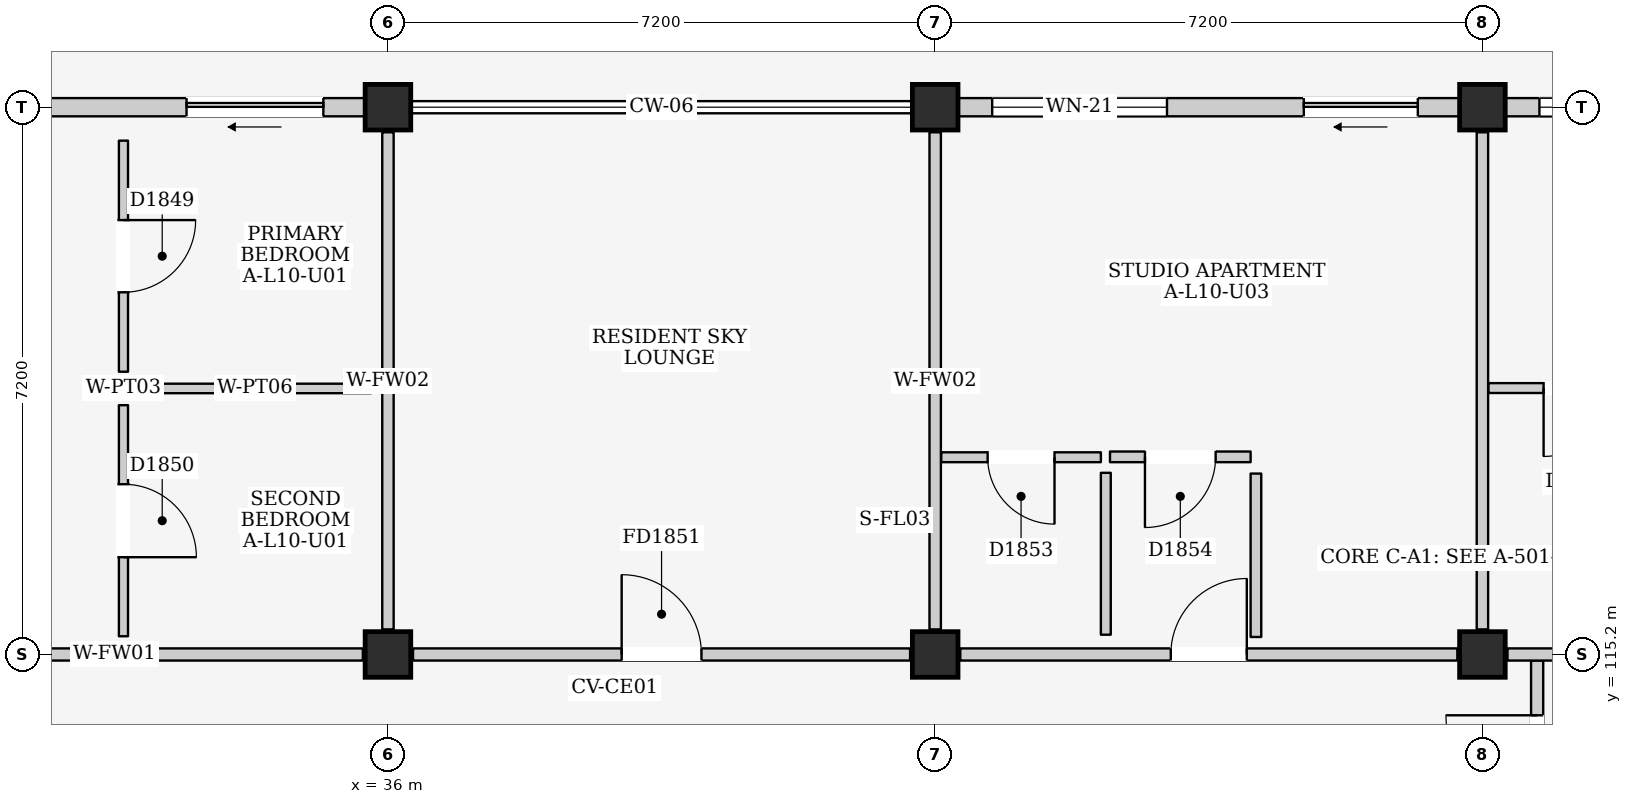
"""IFC4 building model, lengths in metres.
Left out: names, types, materials, properties, quantities, classifications, styles, units other than length and angle.
Written with IfcOpenShell. Run it as: python <this file> out.ifc"""

import sys

from ifc_helpers import new_model, si_unit, direction, frame, frame_2d, origin, origin_2d, place, context, subcontext, project, spatial, rectangle, extrude, element, fill, save


model = new_model("IFC4")
c1 = context("Model", 3, precision=1e-05, world=origin(), true_north=direction((0.0, 1.0)))
c2 = subcontext(c1, "Body", "Model", "MODEL_VIEW")
j1 = project(units=[si_unit("LENGTHUNIT", "METRE"), si_unit("PLANEANGLEUNIT", "RADIAN")], contexts=[c1])
p1 = place(None, origin())
s1 = spatial("IfcSite", under=j1, at=p1, CompositionType="ELEMENT")
p2 = place(p1, origin())
s2 = spatial("IfcBuilding", under=s1, at=p2, CompositionType="ELEMENT")
p3 = place(p2, frame((0.0, 0.0, 34.8)))
s3 = spatial("IfcBuildingStorey", under=s2, at=p3, CompositionType="ELEMENT", Elevation=34.8)
for number, where, z_axis, x_axis in (
    (1, (36.0, 115.2, 0.0), (0.0, 0.0, 1.0), (1.0, 0.0, 0.0)),
    (2, (36.0, 122.4, 0.0), (0.0, 0.0, 1.0), (1.0, 0.0, 0.0)),
    (3, (43.2, 115.2, 0.0), (0.0, 0.0, 1.0), (1.0, 0.0, 0.0)),
    (4, (43.2, 122.4, 0.0), (0.0, 0.0, 1.0), (1.0, 0.0, 0.0)),
    (5, (50.4, 115.2, 0.0), (0.0, 0.0, 1.0), (1.0, 0.0, 0.0)),
    (6, (50.4, 122.4, 0.0), (0.0, 0.0, 1.0), (1.0, 0.0, 0.0)),
):
    element("IfcColumn", number, at=place(p3, frame(where, z_axis=z_axis, x_axis=x_axis)), inside=s3, PredefinedType="COLUMN", context=c2, shape_type="SweptSolid", body=[
        extrude(rectangle(XDim=0.6, YDim=0.6, at=origin_2d()), origin(), (0.0, 0.0, 1.0), 3.2),
    ])
p4 = place(p3, frame((29.1, 122.4, 0.0), z_axis=(0.0, 0.0, 1.0), x_axis=(1.0, 0.0, 0.0)))
e7 = element("IfcWall", 7, at=p4, inside=s3, PredefinedType="ELEMENTEDWALL", context=c2, shape_type="SweptSolid", body=[
    extrude(rectangle(XDim=6.6, YDim=0.24, at=frame_2d((3.3, 0.0))), origin(), (0.0, 0.0, 1.0), 2.495),
])
p5 = place(p4, frame((4.25, 0.0, 0.0)))
e8 = element("IfcOpeningElement", 8, at=p5, cuts=e7, PredefinedType="OPENING", context=c2, shape_type="SweptSolid", body=[
    extrude(rectangle(XDim=1.8, YDim=2.12, at=frame_2d((0.9, 1.06))), frame((0.0, 0.135, 0.0), z_axis=(0.0, -1.0, 0.0), x_axis=(1.0, 0.0, 0.0)), (0.0, 0.0, 1.0), 0.27),
])
p6 = place(p4, frame((0.45, 0.0, 0.9)))
e9 = element("IfcOpeningElement", 9, at=p6, cuts=e7, PredefinedType="OPENING", context=c2, shape_type="SweptSolid", body=[
    extrude(rectangle(XDim=1.65, YDim=1.35, at=frame_2d((0.825, 0.675))), frame((0.0, 0.135, 0.0), z_axis=(0.0, -1.0, 0.0), x_axis=(1.0, 0.0, 0.0)), (0.0, 0.0, 1.0), 0.27),
])
p7 = place(p3, frame((43.5, 122.4, 0.0), z_axis=(0.0, 0.0, 1.0), x_axis=(1.0, 0.0, 0.0)))
e10 = element("IfcWall", 10, at=p7, inside=s3, PredefinedType="ELEMENTEDWALL", context=c2, shape_type="SweptSolid", body=[
    extrude(rectangle(XDim=6.6, YDim=0.24, at=frame_2d((3.3, 0.0))), origin(), (0.0, 0.0, 1.0), 2.495),
])
p8 = place(p7, frame((4.55, 0.0, 0.0)))
e11 = element("IfcOpeningElement", 11, at=p8, cuts=e10, PredefinedType="OPENING", context=c2, shape_type="SweptSolid", body=[
    extrude(rectangle(XDim=1.5, YDim=2.12, at=frame_2d((0.75, 1.06))), frame((0.0, 0.135, 0.0), z_axis=(0.0, -1.0, 0.0), x_axis=(1.0, 0.0, 0.0)), (0.0, 0.0, 1.0), 0.27),
])
p9 = place(p7, frame((0.45, 0.0, 0.785)))
e12 = element("IfcOpeningElement", 12, at=p9, cuts=e10, PredefinedType="OPENING", context=c2, shape_type="SweptSolid", body=[
    extrude(rectangle(XDim=2.3, YDim=1.6, at=frame_2d((1.15, 0.8))), frame((0.0, 0.135, 0.0), z_axis=(0.0, -1.0, 0.0), x_axis=(1.0, 0.0, 0.0)), (0.0, 0.0, 1.0), 0.27),
])
p10 = place(p3, frame((50.7, 122.4, 0.0), z_axis=(0.0, 0.0, 1.0), x_axis=(1.0, 0.0, 0.0)))
e13 = element("IfcWall", 13, at=p10, inside=s3, PredefinedType="ELEMENTEDWALL", context=c2, shape_type="SweptSolid", body=[
    extrude(rectangle(XDim=6.6, YDim=0.24, at=frame_2d((3.3, 0.0))), origin(), (0.0, 0.0, 1.0), 2.495),
])
p11 = place(p10, frame((3.65, 0.0, 0.0)))
e14 = element("IfcOpeningElement", 14, at=p11, cuts=e13, PredefinedType="OPENING", context=c2, shape_type="SweptSolid", body=[
    extrude(rectangle(XDim=2.4, YDim=2.12, at=frame_2d((1.2, 1.06))), frame((0.0, 0.135, 0.0), z_axis=(0.0, -1.0, 0.0), x_axis=(1.0, 0.0, 0.0)), (0.0, 0.0, 1.0), 0.27),
])
p12 = place(p10, frame((0.45, 0.0, 0.9)))
e15 = element("IfcOpeningElement", 15, at=p12, cuts=e13, PredefinedType="OPENING", context=c2, shape_type="SweptSolid", body=[
    extrude(rectangle(XDim=1.55, YDim=1.45, at=frame_2d((0.775, 0.725))), frame((0.0, 0.135, 0.0), z_axis=(0.0, -1.0, 0.0), x_axis=(1.0, 0.0, 0.0)), (0.0, 0.0, 1.0), 0.27),
])
p13 = place(p3, frame((51.12, 111.1, 0.0), z_axis=(0.0, 0.0, 1.0), x_axis=(0.0, 1.0, 0.0)))
e16 = element("IfcWall", 16, at=p13, inside=s3, PredefinedType="PARTITIONING", context=c2, shape_type="SweptSolid", body=[
    extrude(rectangle(XDim=4.02, YDim=0.16, at=frame_2d((2.01, 0.0))), origin(), (0.0, 0.0, 1.0), 2.96),
])
p14 = place(p13, frame((2.1, 0.0, 0.0)))
e17 = element("IfcOpeningElement", 17, at=p14, cuts=e16, PredefinedType="OPENING", context=c2, shape_type="SweptSolid", body=[
    extrude(rectangle(XDim=1.2, YDim=2.2, at=frame_2d((0.6, 1.1))), frame((0.0, 0.095, 0.0), z_axis=(0.0, -1.0, 0.0), x_axis=(1.0, 0.0, 0.0)), (0.0, 0.0, 1.0), 0.19),
])
p15 = place(p3, frame((29.13, 115.2, 0.0), z_axis=(0.0, 0.0, 1.0), x_axis=(1.0, 0.0, 0.0)))
e18 = element("IfcWall", 18, at=p15, inside=s3, PredefinedType="PARTITIONING", context=c2, shape_type="SweptSolid", body=[
    extrude(rectangle(XDim=6.54, YDim=0.16, at=frame_2d((3.27, 0.0))), origin(), (0.0, 0.0, 1.0), 2.295),
])
p16 = place(p15, frame((0.18, 0.0, 0.0)))
e19 = element("IfcOpeningElement", 19, at=p16, cuts=e18, PredefinedType="OPENING", context=c2, shape_type="SweptSolid", body=[
    extrude(rectangle(XDim=1.0, YDim=2.15, at=frame_2d((0.5, 1.075))), frame((0.0, 0.095, 0.0), z_axis=(0.0, -1.0, 0.0), x_axis=(1.0, 0.0, 0.0)), (0.0, 0.0, 1.0), 0.19),
])
p17 = place(p3, frame((36.0, 115.53, 0.0), z_axis=(0.0, 0.0, 1.0), x_axis=(0.0, 1.0, 0.0)))
e20 = element("IfcWall", 20, at=p17, inside=s3, PredefinedType="PARTITIONING", context=c2, shape_type="SweptSolid", body=[
    extrude(rectangle(XDim=6.54, YDim=0.15, at=frame_2d((3.27, 0.0))), origin(), (0.0, 0.0, 1.0), 2.445),
])
p18 = place(p3, frame((32.52, 118.92, 0.0), z_axis=(0.0, 0.0, 1.0), x_axis=(0.0, 1.0, 0.0)))
e21 = element("IfcWall", 21, at=p18, inside=s3, PredefinedType="PARTITIONING", context=c2, shape_type="SweptSolid", body=[
    extrude(rectangle(XDim=3.04, YDim=0.12, at=frame_2d((1.52, 0.0))), origin(), (0.0, 0.0, 1.0), 2.96),
])
p19 = place(p18, frame((1.045, 0.0, 0.0)))
e22 = element("IfcOpeningElement", 22, at=p19, cuts=e21, PredefinedType="OPENING", context=c2, shape_type="SweptSolid", body=[
    extrude(rectangle(XDim=0.95, YDim=2.15, at=frame_2d((0.475, 1.075))), frame((0.0, 0.075, 0.0), z_axis=(0.0, -1.0, 0.0), x_axis=(1.0, 0.0, 0.0)), (0.0, 0.0, 1.0), 0.15),
])
p20 = place(p3, frame((32.72, 118.7, 0.0), z_axis=(0.0, 0.0, 1.0), x_axis=(1.0, 0.0, 0.0)))
e23 = element("IfcWall", 23, at=p20, inside=s3, PredefinedType="PARTITIONING", context=c2, shape_type="SweptSolid", body=[
    extrude(rectangle(XDim=3.06, YDim=0.125, at=frame_2d((1.53, 0.0))), origin(), (0.0, 0.0, 1.0), 2.96),
])
p21 = place(p3, frame((32.52, 115.44, 0.0), z_axis=(0.0, 0.0, 1.0), x_axis=(0.0, 1.0, 0.0)))
e24 = element("IfcWall", 24, at=p21, inside=s3, PredefinedType="PARTITIONING", context=c2, shape_type="SweptSolid", body=[
    extrude(rectangle(XDim=3.04, YDim=0.12, at=frame_2d((1.52, 0.0))), origin(), (0.0, 0.0, 1.0), 2.96),
])
p22 = place(p21, frame((1.04, 0.0, 0.0)))
e25 = element("IfcOpeningElement", 25, at=p22, cuts=e24, PredefinedType="OPENING", context=c2, shape_type="SweptSolid", body=[
    extrude(rectangle(XDim=0.96, YDim=2.15, at=frame_2d((0.48, 1.075))), frame((0.0, 0.075, 0.0), z_axis=(0.0, -1.0, 0.0), x_axis=(1.0, 0.0, 0.0)), (0.0, 0.0, 1.0), 0.15),
])
p23 = place(p3, frame((36.33, 115.2, 0.0), z_axis=(0.0, 0.0, 1.0), x_axis=(1.0, 0.0, 0.0)))
e26 = element("IfcWall", 26, at=p23, inside=s3, PredefinedType="PARTITIONING", context=c2, shape_type="SweptSolid", body=[
    extrude(rectangle(XDim=6.54, YDim=0.16, at=frame_2d((3.27, 0.0))), origin(), (0.0, 0.0, 1.0), 2.295),
])
p24 = place(p23, frame((2.745, 0.0, 0.0)))
e27 = element("IfcOpeningElement", 27, at=p24, cuts=e26, PredefinedType="OPENING", context=c2, shape_type="SweptSolid", body=[
    extrude(rectangle(XDim=1.05, YDim=2.15, at=frame_2d((0.525, 1.075))), frame((0.0, 0.095, 0.0), z_axis=(0.0, -1.0, 0.0), x_axis=(1.0, 0.0, 0.0)), (0.0, 0.0, 1.0), 0.19),
])
p25 = place(p3, frame((43.2, 115.53, 0.0), z_axis=(0.0, 0.0, 1.0), x_axis=(0.0, 1.0, 0.0)))
e28 = element("IfcWall", 28, at=p25, inside=s3, PredefinedType="PARTITIONING", context=c2, shape_type="SweptSolid", body=[
    extrude(rectangle(XDim=6.54, YDim=0.15, at=frame_2d((3.27, 0.0))), origin(), (0.0, 0.0, 1.0), 2.445),
])
p26 = place(p3, frame((43.53, 115.2, 0.0), z_axis=(0.0, 0.0, 1.0), x_axis=(1.0, 0.0, 0.0)))
e29 = element("IfcWall", 29, at=p26, inside=s3, PredefinedType="PARTITIONING", context=c2, shape_type="SweptSolid", body=[
    extrude(rectangle(XDim=6.54, YDim=0.16, at=frame_2d((3.27, 0.0))), origin(), (0.0, 0.0, 1.0), 2.295),
])
p27 = place(p26, frame((2.77, 0.0, 0.0)))
e30 = element("IfcOpeningElement", 30, at=p27, cuts=e29, PredefinedType="OPENING", context=c2, shape_type="SweptSolid", body=[
    extrude(rectangle(XDim=1.0, YDim=2.15, at=frame_2d((0.5, 1.075))), frame((0.0, 0.095, 0.0), z_axis=(0.0, -1.0, 0.0), x_axis=(1.0, 0.0, 0.0)), (0.0, 0.0, 1.0), 0.19),
])
p28 = place(p3, frame((50.4, 115.53, 0.0), z_axis=(0.0, 0.0, 1.0), x_axis=(0.0, 1.0, 0.0)))
e31 = element("IfcWall", 31, at=p28, inside=s3, PredefinedType="PARTITIONING", context=c2, shape_type="SweptSolid", body=[
    extrude(rectangle(XDim=6.54, YDim=0.15, at=frame_2d((3.27, 0.0))), origin(), (0.0, 0.0, 1.0), 2.445),
])
p29 = place(p3, frame((43.28, 117.795, 0.0), z_axis=(0.0, 0.0, 1.0), x_axis=(1.0, 0.0, 0.0)))
e32 = element("IfcWall", 32, at=p29, inside=s3, PredefinedType="PARTITIONING", context=c2, shape_type="SweptSolid", body=[
    extrude(rectangle(XDim=2.1, YDim=0.13, at=frame_2d((1.05, 0.0))), origin(), (0.0, 0.0, 1.0), 2.96),
])
p30 = place(p29, frame((0.61, 0.0, 0.0)))
e33 = element("IfcOpeningElement", 33, at=p30, cuts=e32, PredefinedType="OPENING", context=c2, shape_type="SweptSolid", body=[
    extrude(rectangle(XDim=0.88, YDim=2.1, at=frame_2d((0.44, 1.05))), frame((0.0, 0.08, 0.0), z_axis=(0.0, -1.0, 0.0), x_axis=(1.0, 0.0, 0.0)), (0.0, 0.0, 1.0), 0.16),
])
p31 = place(p3, frame((45.445, 115.46, 0.0), z_axis=(0.0, 0.0, 1.0), x_axis=(0.0, 1.0, 0.0)))
e34 = element("IfcWall", 34, at=p31, inside=s3, PredefinedType="PARTITIONING", context=c2, shape_type="SweptSolid", body=[
    extrude(rectangle(XDim=2.13, YDim=0.13, at=frame_2d((1.065, 0.0))), origin(), (0.0, 0.0, 1.0), 2.96),
])
p32 = place(p3, frame((45.5, 117.8, 0.0), z_axis=(0.0, 0.0, 1.0), x_axis=(1.0, 0.0, 0.0)))
e35 = element("IfcWall", 35, at=p32, inside=s3, PredefinedType="PARTITIONING", context=c2, shape_type="SweptSolid", body=[
    extrude(rectangle(XDim=1.85, YDim=0.14, at=frame_2d((0.925, 0.0))), origin(), (0.0, 0.0, 1.0), 2.96),
])
p33 = place(p32, frame((0.46, 0.0, 0.0)))
e36 = element("IfcOpeningElement", 36, at=p33, cuts=e35, PredefinedType="OPENING", context=c2, shape_type="SweptSolid", body=[
    extrude(rectangle(XDim=0.93, YDim=2.14, at=frame_2d((0.465, 1.07))), frame((0.0, 0.085, 0.0), z_axis=(0.0, -1.0, 0.0), x_axis=(1.0, 0.0, 0.0)), (0.0, 0.0, 1.0), 0.17),
])
p34 = place(p3, frame((47.42, 115.43, 0.0), z_axis=(0.0, 0.0, 1.0), x_axis=(0.0, 1.0, 0.0)))
e37 = element("IfcWall", 37, at=p34, inside=s3, PredefinedType="PARTITIONING", context=c2, shape_type="SweptSolid", body=[
    extrude(rectangle(XDim=2.15, YDim=0.14, at=frame_2d((1.075, 0.0))), origin(), (0.0, 0.0, 1.0), 2.96),
])
p35 = place(p3, frame((50.73, 115.2, 0.0), z_axis=(0.0, 0.0, 1.0), x_axis=(1.0, 0.0, 0.0)))
e38 = element("IfcWall", 38, at=p35, inside=s3, PredefinedType="PARTITIONING", context=c2, shape_type="SweptSolid", body=[
    extrude(rectangle(XDim=6.54, YDim=0.16, at=frame_2d((3.27, 0.0))), origin(), (0.0, 0.0, 1.0), 2.295),
])
p36 = place(p3, frame((50.48, 118.705, 0.0), z_axis=(0.0, 0.0, 1.0), x_axis=(1.0, 0.0, 0.0)))
e39 = element("IfcWall", 39, at=p36, inside=s3, PredefinedType="PARTITIONING", context=c2, shape_type="SweptSolid", body=[
    extrude(rectangle(XDim=2.35, YDim=0.13, at=frame_2d((1.175, 0.0))), origin(), (0.0, 0.0, 1.0), 2.96),
])
p37 = place(p36, frame((0.725, 0.0, 0.0)))
e40 = element("IfcOpeningElement", 40, at=p37, cuts=e39, PredefinedType="OPENING", context=c2, shape_type="SweptSolid", body=[
    extrude(rectangle(XDim=0.9, YDim=2.1, at=frame_2d((0.45, 1.05))), frame((0.0, 0.08, 0.0), z_axis=(0.0, -1.0, 0.0), x_axis=(1.0, 0.0, 0.0)), (0.0, 0.0, 1.0), 0.16),
])
p38 = place(p5, frame((1.8, 0.0, 0.0), z_axis=(0.0, 0.0, 1.0), x_axis=(-1.0, 0.0, 0.0)))
e41 = element("IfcDoor", 41, at=p38, inside=s3, OperationType="SLIDING_TO_LEFT", PredefinedType="DOOR", context=c2, shape_type="SweptSolid", body=[
    extrude(rectangle(XDim=1.8, YDim=2.12, at=frame_2d((0.9, 1.06))), frame((0.0, 0.025, 0.0), z_axis=(0.0, -1.0, 0.0), x_axis=(1.0, 0.0, 0.0)), (0.0, 0.0, 1.0), 0.05),
])
fill(e8, e41)
p39 = place(p8, frame((1.5, 0.0, 0.0), z_axis=(0.0, 0.0, 1.0), x_axis=(-1.0, 0.0, 0.0)))
e42 = element("IfcDoor", 42, at=p39, inside=s3, OperationType="SLIDING_TO_LEFT", PredefinedType="DOOR", context=c2, shape_type="SweptSolid", body=[
    extrude(rectangle(XDim=1.5, YDim=2.12, at=frame_2d((0.75, 1.06))), frame((0.0, 0.025, 0.0), z_axis=(0.0, -1.0, 0.0), x_axis=(1.0, 0.0, 0.0)), (0.0, 0.0, 1.0), 0.05),
])
fill(e11, e42)
p40 = place(p9, origin())
e43 = element("IfcWindow", 43, at=p40, inside=s3, PartitioningType="TRIPLE_PANEL_VERTICAL", PredefinedType="WINDOW", context=c2, shape_type="SweptSolid", body=[
    extrude(rectangle(XDim=2.3, YDim=1.6, at=frame_2d((1.15, 0.8))), frame((0.0, 0.03, 0.0), z_axis=(0.0, -1.0, 0.0), x_axis=(1.0, 0.0, 0.0)), (0.0, 0.0, 1.0), 0.06),
])
fill(e12, e43)
p41 = place(p12, origin())
e44 = element("IfcWindow", 44, at=p41, inside=s3, PartitioningType="DOUBLE_PANEL_VERTICAL", PredefinedType="WINDOW", context=c2, shape_type="SweptSolid", body=[
    extrude(rectangle(XDim=1.55, YDim=1.45, at=frame_2d((0.775, 0.725))), frame((0.0, 0.03, 0.0), z_axis=(0.0, -1.0, 0.0), x_axis=(1.0, 0.0, 0.0)), (0.0, 0.0, 1.0), 0.06),
])
fill(e15, e44)
p42 = place(p14, origin())
e45 = element("IfcDoor", 45, at=p42, inside=s3, OperationType="SINGLE_SWING_RIGHT", PredefinedType="DOOR", context=c2, shape_type="SweptSolid", body=[
    extrude(rectangle(XDim=1.2, YDim=2.2, at=frame_2d((0.6, 1.1))), frame((0.0, 0.025, 0.0), z_axis=(0.0, -1.0, 0.0), x_axis=(1.0, 0.0, 0.0)), (0.0, 0.0, 1.0), 0.05),
])
fill(e17, e45)
p43 = place(p19, frame((0.95, 0.0, 0.0), z_axis=(0.0, 0.0, 1.0), x_axis=(-1.0, 0.0, 0.0)))
e46 = element("IfcDoor", 46, at=p43, inside=s3, OperationType="SINGLE_SWING_LEFT", PredefinedType="DOOR", context=c2, shape_type="SweptSolid", body=[
    extrude(rectangle(XDim=0.95, YDim=2.15, at=frame_2d((0.475, 1.075))), frame((0.0, 0.025, 0.0), z_axis=(0.0, -1.0, 0.0), x_axis=(1.0, 0.0, 0.0)), (0.0, 0.0, 1.0), 0.05),
])
fill(e22, e46)
p44 = place(p22, frame((0.96, 0.0, 0.0), z_axis=(0.0, 0.0, 1.0), x_axis=(-1.0, 0.0, 0.0)))
e47 = element("IfcDoor", 47, at=p44, inside=s3, OperationType="SINGLE_SWING_RIGHT", PredefinedType="DOOR", context=c2, shape_type="SweptSolid", body=[
    extrude(rectangle(XDim=0.96, YDim=2.15, at=frame_2d((0.48, 1.075))), frame((0.0, 0.025, 0.0), z_axis=(0.0, -1.0, 0.0), x_axis=(1.0, 0.0, 0.0)), (0.0, 0.0, 1.0), 0.05),
])
fill(e25, e47)
p45 = place(p24, origin())
e48 = element("IfcDoor", 48, at=p45, inside=s3, OperationType="SINGLE_SWING_LEFT", PredefinedType="DOOR", context=c2, shape_type="SweptSolid", body=[
    extrude(rectangle(XDim=1.05, YDim=2.15, at=frame_2d((0.525, 1.075))), frame((0.0, 0.025, 0.0), z_axis=(0.0, -1.0, 0.0), x_axis=(1.0, 0.0, 0.0)), (0.0, 0.0, 1.0), 0.05),
])
fill(e27, e48)
p46 = place(p27, origin())
e49 = element("IfcDoor", 49, at=p46, inside=s3, OperationType="SINGLE_SWING_RIGHT", PredefinedType="DOOR", context=c2, shape_type="SweptSolid", body=[
    extrude(rectangle(XDim=1.0, YDim=2.15, at=frame_2d((0.5, 1.075))), frame((0.0, 0.025, 0.0), z_axis=(0.0, -1.0, 0.0), x_axis=(1.0, 0.0, 0.0)), (0.0, 0.0, 1.0), 0.05),
])
fill(e30, e49)
p47 = place(p30, frame((0.88, 0.0, 0.0), z_axis=(0.0, 0.0, 1.0), x_axis=(-1.0, 0.0, 0.0)))
e50 = element("IfcDoor", 50, at=p47, inside=s3, OperationType="SINGLE_SWING_LEFT", PredefinedType="DOOR", context=c2, shape_type="SweptSolid", body=[
    extrude(rectangle(XDim=0.88, YDim=2.1, at=frame_2d((0.44, 1.05))), frame((0.0, 0.025, 0.0), z_axis=(0.0, -1.0, 0.0), x_axis=(1.0, 0.0, 0.0)), (0.0, 0.0, 1.0), 0.05),
])
fill(e33, e50)
p48 = place(p33, frame((0.93, 0.0, 0.0), z_axis=(0.0, 0.0, 1.0), x_axis=(-1.0, 0.0, 0.0)))
e51 = element("IfcDoor", 51, at=p48, inside=s3, OperationType="SINGLE_SWING_RIGHT", PredefinedType="DOOR", context=c2, shape_type="SweptSolid", body=[
    extrude(rectangle(XDim=0.93, YDim=2.14, at=frame_2d((0.465, 1.07))), frame((0.0, 0.025, 0.0), z_axis=(0.0, -1.0, 0.0), x_axis=(1.0, 0.0, 0.0)), (0.0, 0.0, 1.0), 0.05),
])
fill(e36, e51)
p49 = place(p37, frame((0.9, 0.0, 0.0), z_axis=(0.0, 0.0, 1.0), x_axis=(-1.0, 0.0, 0.0)))
e52 = element("IfcDoor", 52, at=p49, inside=s3, OperationType="SINGLE_SWING_RIGHT", PredefinedType="DOOR", context=c2, shape_type="SweptSolid", body=[
    extrude(rectangle(XDim=0.9, YDim=2.1, at=frame_2d((0.45, 1.05))), frame((0.0, 0.025, 0.0), z_axis=(0.0, -1.0, 0.0), x_axis=(1.0, 0.0, 0.0)), (0.0, 0.0, 1.0), 0.05),
])
fill(e40, e52)
save(model, sys.argv[1])
